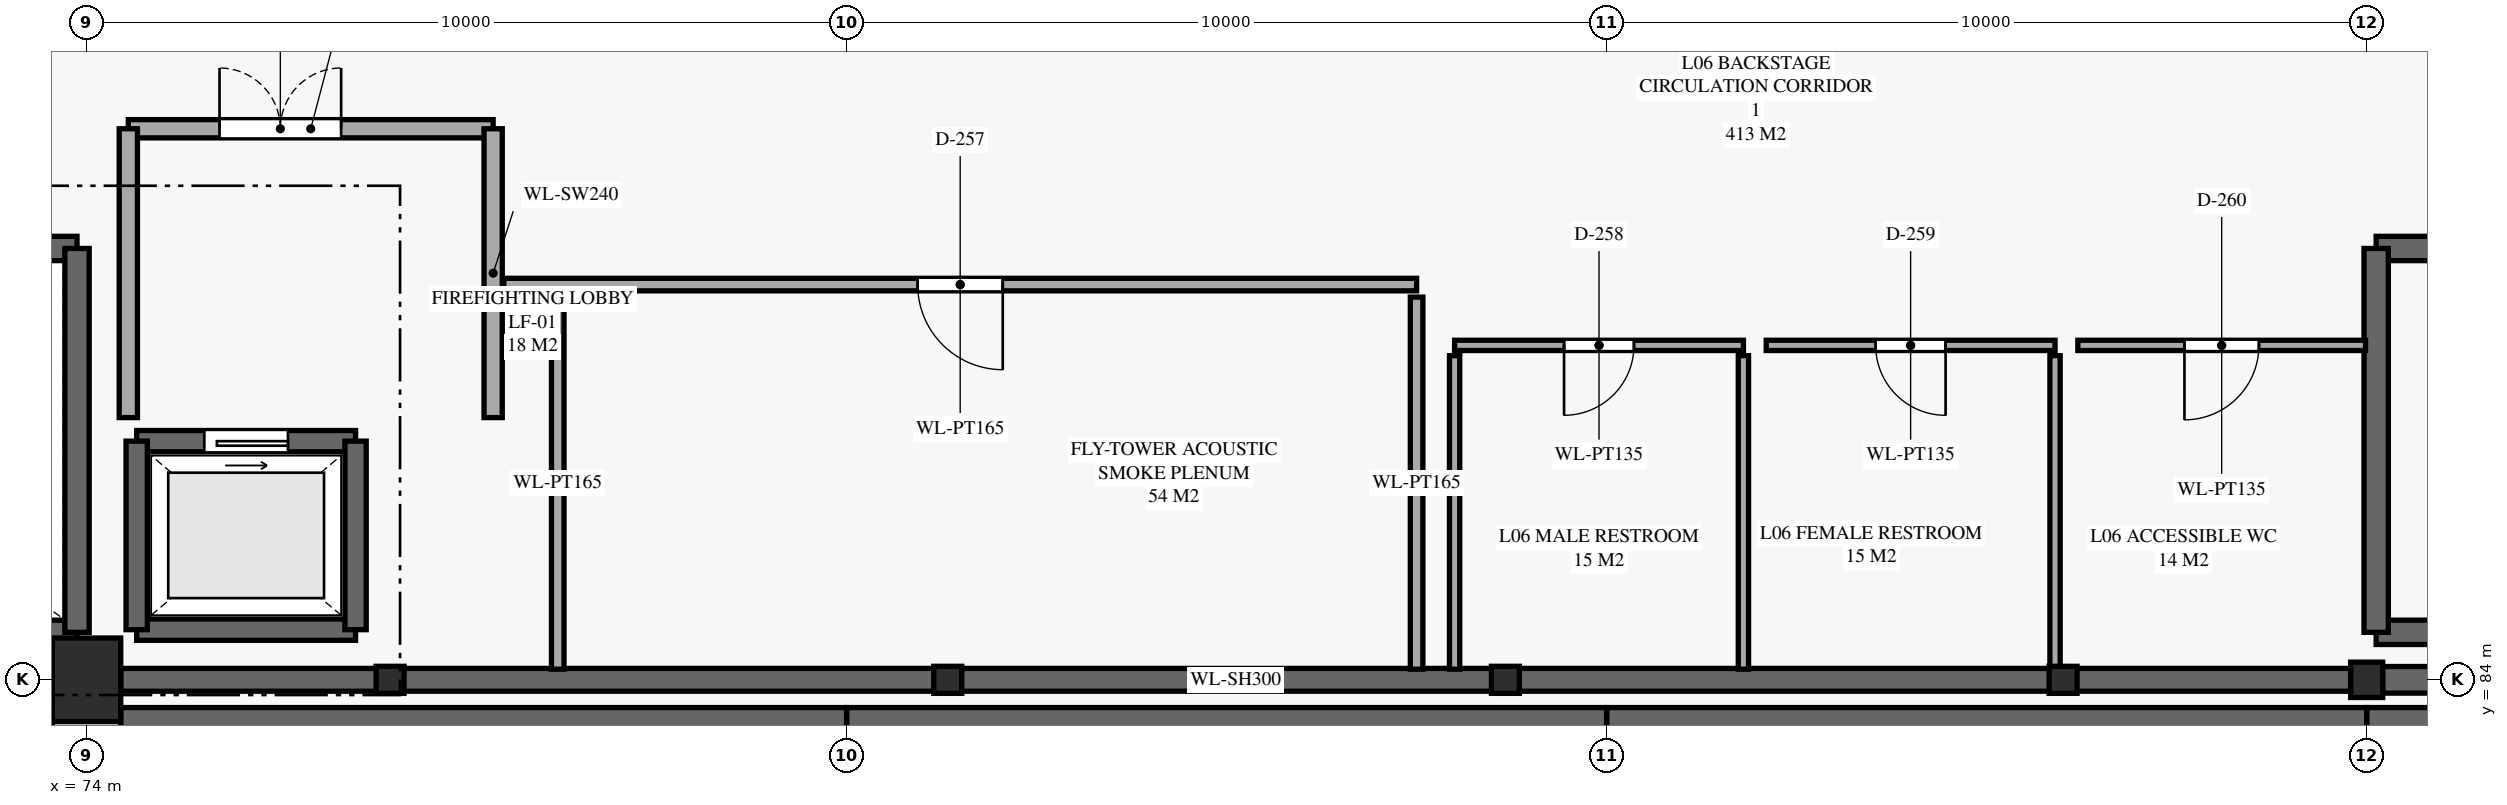
"""IFC4 building model, lengths in metres.
Left out: names, types, materials, properties, quantities, classifications, styles, units other than length and angle.
Written with IfcOpenShell. Run it as: python <this file> out.ifc"""

import sys

from ifc_helpers import new_model, si_unit, direction, frame, frame_2d, origin, origin_2d, place, context, subcontext, project, spatial, rectangle, i_section, extrude, element, fill, save


model = new_model("IFC4")
c1 = context("Model", 3, precision=1e-05, world=origin(), true_north=direction((0.0, 1.0)))
c2 = subcontext(c1, "Body", "Model", "MODEL_VIEW")
j1 = project(units=[si_unit("LENGTHUNIT", "METRE"), si_unit("PLANEANGLEUNIT", "RADIAN")], contexts=[c1])
p1 = place(None, origin())
s1 = spatial("IfcSite", under=j1, at=p1, CompositionType="ELEMENT")
p2 = place(p1, origin())
s2 = spatial("IfcBuilding", under=s1, at=p2, CompositionType="ELEMENT")
p3 = place(p2, frame((0.0, 0.0, 29.6)))
s3 = spatial("IfcBuildingStorey", under=s2, at=p3, CompositionType="ELEMENT", Elevation=29.6)
p4 = place(p3, frame((74.0, 84.0, 0.0), z_axis=(0.0, 0.0, 1.0), x_axis=(1.0, 0.0, 0.0)))
e1 = element("IfcColumn", 1, at=p4, inside=s3, PredefinedType="COLUMN", context=c2, shape_type="SweptSolid", body=[
    extrude(rectangle(XDim=0.9, YDim=1.1, at=origin_2d()), origin(), (0.0, 0.0, 1.0), 4.6),
])
p5 = place(p3, frame((104.0, 84.0, 0.0), z_axis=(0.0, 0.0, 1.0), x_axis=(1.0, 0.0, 0.0)))
e2 = element("IfcColumn", 2, at=p5, inside=s3, PredefinedType="COLUMN", context=c2, shape_type="SweptSolid", body=[
    extrude(i_section(OverallWidth=0.422, OverallDepth=0.465, WebThickness=0.045, FlangeThickness=0.073, FilletRadius=0.02, at=origin_2d()), origin(), (0.0, 0.0, 1.0), 4.6),
])
p6 = place(p2, frame((0.0, 0.0, 24.8)))
s4 = spatial("IfcBuildingStorey", under=s2, at=p6, CompositionType="ELEMENT", Elevation=24.8)
for number, where, z_axis, x_axis in (
    (3, (85.332, 84.0, -0.3), (0.0, 0.0, 1.0), (1.0, 0.0, 0.0)),
    (4, (100.006, 84.0, -0.3), (0.0, 0.0, 1.0), (1.0, 0.0, 0.0)),
):
    element("IfcColumn", number, at=place(p6, frame(where, z_axis=z_axis, x_axis=x_axis)), inside=s4, PredefinedType="COLUMN", context=c2, shape_type="SweptSolid", body=[
        extrude(i_section(OverallWidth=0.368, OverallDepth=0.356, WebThickness=0.011, FlangeThickness=0.018, FilletRadius=0.015, at=origin_2d()), origin(), (0.0, 0.0, 1.0), 6.556),
    ])
p7 = place(p3, frame((64.625, 84.625, 0.0), z_axis=(0.0, 0.0, 1.0), x_axis=(1.0, 0.0, 0.0)))
e5 = element("IfcWall", 5, at=p7, inside=s3, PredefinedType="SHEAR", context=c2, shape_type="SweptSolid", body=[
    extrude(rectangle(XDim=9.25, YDim=0.32, at=frame_2d((4.625, 0.0))), origin(), (0.0, 0.0, 1.0), 4.35),
])
p8 = place(p3, frame((73.875, 89.675, 0.0), z_axis=(0.0, 0.0, 1.0), x_axis=(-1.0, 0.0, 0.0)))
e6 = element("IfcWall", 6, at=p8, inside=s3, PredefinedType="SHEAR", context=c2, shape_type="SweptSolid", body=[
    extrude(rectangle(XDim=9.25, YDim=0.32, at=frame_2d((4.625, 0.0))), origin(), (0.0, 0.0, 1.0), 4.35),
])
p9 = place(p8, frame((7.2, 0.0, 0.0)))
e7 = element("IfcOpeningElement", 7, at=p9, cuts=e6, PredefinedType="OPENING", context=c2, shape_type="SweptSolid", body=[
    extrude(rectangle(XDim=1.15, YDim=2.2, at=frame_2d((0.575, 1.1))), frame((0.0, 0.17, 0.0), z_axis=(0.0, -1.0, 0.0), x_axis=(1.0, 0.0, 0.0)), (0.0, 0.0, 1.0), 0.34),
])
p10 = place(p3, frame((73.875, 84.625, 0.0), z_axis=(0.0, 0.0, 1.0), x_axis=(0.0, 1.0, 0.0)))
e8 = element("IfcWall", 8, at=p10, inside=s3, PredefinedType="SHEAR", context=c2, shape_type="SweptSolid", body=[
    extrude(rectangle(XDim=5.05, YDim=0.32, at=frame_2d((2.525, 0.0))), origin(), (0.0, 0.0, 1.0), 4.38),
])
p11 = place(p3, frame((104.125, 84.625, 0.0), z_axis=(0.0, 0.0, 1.0), x_axis=(1.0, 0.0, 0.0)))
e9 = element("IfcWall", 9, at=p11, inside=s3, PredefinedType="SHEAR", context=c2, shape_type="SweptSolid", body=[
    extrude(rectangle(XDim=9.25, YDim=0.32, at=frame_2d((4.625, 0.0))), origin(), (0.0, 0.0, 1.0), 4.35),
])
p12 = place(p3, frame((113.375, 89.675, 0.0), z_axis=(0.0, 0.0, 1.0), x_axis=(-1.0, 0.0, 0.0)))
e10 = element("IfcWall", 10, at=p12, inside=s3, PredefinedType="SHEAR", context=c2, shape_type="SweptSolid", body=[
    extrude(rectangle(XDim=9.25, YDim=0.32, at=frame_2d((4.625, 0.0))), origin(), (0.0, 0.0, 1.0), 4.35),
])
p13 = place(p12, frame((7.2, 0.0, 0.0)))
e11 = element("IfcOpeningElement", 11, at=p13, cuts=e10, PredefinedType="OPENING", context=c2, shape_type="SweptSolid", body=[
    extrude(rectangle(XDim=1.15, YDim=2.2, at=frame_2d((0.575, 1.1))), frame((0.0, 0.17, 0.0), z_axis=(0.0, -1.0, 0.0), x_axis=(1.0, 0.0, 0.0)), (0.0, 0.0, 1.0), 0.34),
])
p14 = place(p3, frame((104.125, 89.675, 0.0), z_axis=(0.0, 0.0, 1.0), x_axis=(0.0, -1.0, 0.0)))
e12 = element("IfcWall", 12, at=p14, inside=s3, PredefinedType="SHEAR", context=c2, shape_type="SweptSolid", body=[
    extrude(rectangle(XDim=5.05, YDim=0.32, at=frame_2d((2.525, 0.0))), origin(), (0.0, 0.0, 1.0), 4.38),
])
p15 = place(p3, frame((74.66, 84.66, 0.0), z_axis=(0.0, 0.0, 1.0), x_axis=(1.0, 0.0, 0.0)))
e13 = element("IfcWall", 13, at=p15, inside=s3, PredefinedType="SHEAR", context=c2, shape_type="SweptSolid", body=[
    extrude(rectangle(XDim=2.88, YDim=0.28, at=frame_2d((1.44, 0.0))), origin(), (0.0, 0.0, 1.0), 4.38),
])
p16 = place(p3, frame((77.54, 87.14, 0.0), z_axis=(0.0, 0.0, 1.0), x_axis=(-1.0, 0.0, 0.0)))
e14 = element("IfcWall", 14, at=p16, inside=s3, PredefinedType="SHEAR", context=c2, shape_type="SweptSolid", body=[
    extrude(rectangle(XDim=2.88, YDim=0.28, at=frame_2d((1.44, 0.0))), origin(), (0.0, 0.0, 1.0), 4.38),
])
p17 = place(p16, frame((0.89, 0.0, 0.0)))
e15 = element("IfcOpeningElement", 15, at=p17, cuts=e14, PredefinedType="OPENING", context=c2, shape_type="SweptSolid", body=[
    extrude(rectangle(XDim=1.1, YDim=2.2, at=frame_2d((0.55, 1.1))), frame((0.0, 0.15, 0.0), z_axis=(0.0, -1.0, 0.0), x_axis=(1.0, 0.0, 0.0)), (0.0, 0.0, 1.0), 0.3),
])
for number, where, z_axis, x_axis in (
    (16, (74.66, 87.14, 0.0), (0.0, 0.0, 1.0), (0.0, -1.0, 0.0)),
    (17, (77.54, 84.66, 0.0), (0.0, 0.0, 1.0), (0.0, 1.0, 0.0)),
):
    element("IfcWall", number, at=place(p3, frame(where, z_axis=z_axis, x_axis=x_axis)), inside=s3, PredefinedType="SHEAR", context=c2, shape_type="SweptSolid", body=[
        extrude(rectangle(XDim=2.48, YDim=0.28, at=frame_2d((1.24, 0.0))), origin(), (0.0, 0.0, 1.0), 4.38),
    ])
p18 = place(p3, frame((74.55, 91.25, 0.0), z_axis=(0.0, 0.0, 1.0), x_axis=(1.0, 0.0, 0.0)))
e18 = element("IfcWall", 18, at=p18, inside=s3, PredefinedType="SOLIDWALL", context=c2, shape_type="SweptSolid", body=[
    extrude(rectangle(XDim=4.8, YDim=0.24, at=frame_2d((2.4, 0.0))), origin(), (0.0, 0.0, 1.0), 4.35),
])
p19 = place(p18, frame((1.2, 0.0, 0.0)))
e19 = element("IfcOpeningElement", 19, at=p19, cuts=e18, PredefinedType="OPENING", context=c2, shape_type="SweptSolid", body=[
    extrude(rectangle(XDim=1.6, YDim=2.2, at=frame_2d((0.8, 1.1))), frame((0.0, 0.13, 0.0), z_axis=(0.0, -1.0, 0.0), x_axis=(1.0, 0.0, 0.0)), (0.0, 0.0, 1.0), 0.26),
])
p20 = place(p3, frame((74.55, 91.25, 0.0), z_axis=(0.0, 0.0, 1.0), x_axis=(0.0, -1.0, 0.0)))
e20 = element("IfcWall", 20, at=p20, inside=s3, PredefinedType="SOLIDWALL", context=c2, shape_type="SweptSolid", body=[
    extrude(rectangle(XDim=3.8, YDim=0.24, at=frame_2d((1.9, 0.0))), origin(), (0.0, 0.0, 1.0), 4.38),
])
p21 = place(p3, frame((79.35, 87.45, 0.0), z_axis=(0.0, 0.0, 1.0), x_axis=(0.0, 1.0, 0.0)))
e21 = element("IfcWall", 21, at=p21, inside=s3, PredefinedType="SOLIDWALL", context=c2, shape_type="SweptSolid", body=[
    extrude(rectangle(XDim=3.8, YDim=0.24, at=frame_2d((1.9, 0.0))), origin(), (0.0, 0.0, 1.0), 4.35),
])
p22 = place(p3, frame((104.211, 84.0, 0.0), z_axis=(0.0, 0.0, 1.0), x_axis=(1.0, 0.0, 0.0)))
e22 = element("IfcWall", 22, at=p22, inside=s3, PredefinedType="SHEAR", context=c2, shape_type="SweptSolid", body=[
    extrude(rectangle(XDim=9.079, YDim=0.35, at=frame_2d((4.54, 0.0))), origin(), (0.0, 0.0, 1.0), 4.35),
])
p23 = place(p3, frame((74.45, 84.0, 0.0), z_axis=(0.0, 0.0, 1.0), x_axis=(1.0, 0.0, 0.0)))
e23 = element("IfcWall", 23, at=p23, inside=s3, PredefinedType="SHEAR", context=c2, shape_type="SweptSolid", body=[
    extrude(rectangle(XDim=29.339, YDim=0.3, at=frame_2d((14.669, 0.0))), origin(), (0.0, 0.0, 1.0), 4.35),
])
p24 = place(p3, frame((113.29, 83.46, 0.0), z_axis=(0.0, 0.0, 1.0), x_axis=(-1.0, 0.0, 0.0)))
e24 = element("IfcWall", 24, at=p24, inside=s3, PredefinedType="SHEAR", context=c2, shape_type="SweptSolid", body=[
    extrude(rectangle(XDim=9.29, YDim=0.35, at=frame_2d((4.645, 0.0))), origin(), (0.0, 0.0, 1.0), 4.35),
])
for number, where, z_axis, x_axis in (
    (25, (104.0, 83.46, 0.0), (0.0, 0.0, 1.0), (-1.0, 0.0, 0.0)),
    (26, (94.0, 83.46, 0.0), (0.0, 0.0, 1.0), (-1.0, 0.0, 0.0)),
):
    element("IfcWall", number, at=place(p3, frame(where, z_axis=z_axis, x_axis=x_axis)), inside=s3, PredefinedType="SHEAR", context=c2, shape_type="SweptSolid", body=[
        extrude(rectangle(XDim=10.0, YDim=0.35, at=frame_2d((5.0, 0.0))), origin(), (0.0, 0.0, 1.0), 4.35),
    ])
p25 = place(p3, frame((84.0, 83.46, 0.0), z_axis=(0.0, 0.0, 1.0), x_axis=(-1.0, 0.0, 0.0)))
e27 = element("IfcWall", 27, at=p25, inside=s3, PredefinedType="SHEAR", context=c2, shape_type="SweptSolid", body=[
    extrude(rectangle(XDim=9.55, YDim=0.35, at=frame_2d((4.775, 0.0))), origin(), (0.0, 0.0, 1.0), 4.35),
])
p26 = place(p3, frame((91.5, 89.2, 0.0), z_axis=(0.0, 0.0, 1.0), x_axis=(-1.0, 0.0, 0.0)))
e28 = element("IfcWall", 28, at=p26, inside=s3, PredefinedType="PARTITIONING", context=c2, shape_type="SweptSolid", body=[
    extrude(rectangle(XDim=12.01, YDim=0.165, at=frame_2d((6.005, 0.0))), origin(), (0.0, 0.0, 1.0), 4.35),
])
p27 = place(p26, frame((5.445, 0.0, 0.0)))
e29 = element("IfcOpeningElement", 29, at=p27, cuts=e28, PredefinedType="OPENING", context=c2, shape_type="SweptSolid", body=[
    extrude(rectangle(XDim=1.12, YDim=2.25, at=frame_2d((0.56, 1.125))), frame((0.0, 0.093, 0.0), z_axis=(0.0, -1.0, 0.0), x_axis=(1.0, 0.0, 0.0)), (0.0, 0.0, 1.0), 0.185),
])
p28 = place(p3, frame((80.2, 89.035, 0.0), z_axis=(0.0, 0.0, 1.0), x_axis=(0.0, -1.0, 0.0)))
e30 = element("IfcWall", 30, at=p28, inside=s3, PredefinedType="PARTITIONING", context=c2, shape_type="SweptSolid", body=[
    extrude(rectangle(XDim=4.895, YDim=0.165, at=frame_2d((2.448, 0.0))), origin(), (0.0, 0.0, 1.0), 4.35),
])
p29 = place(p3, frame((91.5, 84.14, 0.0), z_axis=(0.0, 0.0, 1.0), x_axis=(0.0, 1.0, 0.0)))
e31 = element("IfcWall", 31, at=p29, inside=s3, PredefinedType="PARTITIONING", context=c2, shape_type="SweptSolid", body=[
    extrude(rectangle(XDim=4.895, YDim=0.165, at=frame_2d((2.448, 0.0))), origin(), (0.0, 0.0, 1.0), 4.38),
])
p30 = place(p3, frame((95.8, 88.4, 0.0), z_axis=(0.0, 0.0, 1.0), x_axis=(-1.0, 0.0, 0.0)))
e32 = element("IfcWall", 32, at=p30, inside=s3, PredefinedType="PARTITIONING", context=c2, shape_type="SweptSolid", body=[
    extrude(rectangle(XDim=3.8, YDim=0.135, at=frame_2d((1.9, 0.0))), origin(), (0.0, 0.0, 1.0), 4.35),
])
p31 = place(p30, frame((1.44, 0.0, 0.0)))
e33 = element("IfcOpeningElement", 33, at=p31, cuts=e32, PredefinedType="OPENING", context=c2, shape_type="SweptSolid", body=[
    extrude(rectangle(XDim=0.92, YDim=2.1, at=frame_2d((0.46, 1.05))), frame((0.0, 0.078, 0.0), z_axis=(0.0, -1.0, 0.0), x_axis=(1.0, 0.0, 0.0)), (0.0, 0.0, 1.0), 0.155),
])
p32 = place(p3, frame((92.0, 88.265, 0.0), z_axis=(0.0, 0.0, 1.0), x_axis=(0.0, -1.0, 0.0)))
e34 = element("IfcWall", 34, at=p32, inside=s3, PredefinedType="PARTITIONING", context=c2, shape_type="SweptSolid", body=[
    extrude(rectangle(XDim=4.125, YDim=0.135, at=frame_2d((2.062, 0.0))), origin(), (0.0, 0.0, 1.0), 4.38),
])
p33 = place(p3, frame((95.8, 84.14, 0.0), z_axis=(0.0, 0.0, 1.0), x_axis=(0.0, 1.0, 0.0)))
e35 = element("IfcWall", 35, at=p33, inside=s3, PredefinedType="PARTITIONING", context=c2, shape_type="SweptSolid", body=[
    extrude(rectangle(XDim=4.125, YDim=0.135, at=frame_2d((2.062, 0.0))), origin(), (0.0, 0.0, 1.0), 4.35),
])
p34 = place(p3, frame((99.9, 88.4, 0.0), z_axis=(0.0, 0.0, 1.0), x_axis=(-1.0, 0.0, 0.0)))
e36 = element("IfcWall", 36, at=p34, inside=s3, PredefinedType="PARTITIONING", context=c2, shape_type="SweptSolid", body=[
    extrude(rectangle(XDim=3.8, YDim=0.135, at=frame_2d((1.9, 0.0))), origin(), (0.0, 0.0, 1.0), 4.35),
])
p35 = place(p34, frame((1.44, 0.0, 0.0)))
e37 = element("IfcOpeningElement", 37, at=p35, cuts=e36, PredefinedType="OPENING", context=c2, shape_type="SweptSolid", body=[
    extrude(rectangle(XDim=0.92, YDim=2.1, at=frame_2d((0.46, 1.05))), frame((0.0, 0.078, 0.0), z_axis=(0.0, -1.0, 0.0), x_axis=(1.0, 0.0, 0.0)), (0.0, 0.0, 1.0), 0.155),
])
p36 = place(p3, frame((99.9, 84.14, 0.0), z_axis=(0.0, 0.0, 1.0), x_axis=(0.0, 1.0, 0.0)))
e38 = element("IfcWall", 38, at=p36, inside=s3, PredefinedType="PARTITIONING", context=c2, shape_type="SweptSolid", body=[
    extrude(rectangle(XDim=4.125, YDim=0.135, at=frame_2d((2.062, 0.0))), origin(), (0.0, 0.0, 1.0), 3.723),
])
p37 = place(p3, frame((103.985, 88.4, 0.0), z_axis=(0.0, 0.0, 1.0), x_axis=(-1.0, 0.0, 0.0)))
e39 = element("IfcWall", 39, at=p37, inside=s3, PredefinedType="PARTITIONING", context=c2, shape_type="SweptSolid", body=[
    extrude(rectangle(XDim=3.785, YDim=0.135, at=frame_2d((1.893, 0.0))), origin(), (0.0, 0.0, 1.0), 4.38),
])
p38 = place(p37, frame((1.403, 0.0, 0.0)))
e40 = element("IfcOpeningElement", 40, at=p38, cuts=e39, PredefinedType="OPENING", context=c2, shape_type="SweptSolid", body=[
    extrude(rectangle(XDim=0.98, YDim=2.1, at=frame_2d((0.49, 1.05))), frame((0.0, 0.078, 0.0), z_axis=(0.0, -1.0, 0.0), x_axis=(1.0, 0.0, 0.0)), (0.0, 0.0, 1.0), 0.155),
])
p39 = place(p17, origin())
e41 = element("IfcDoor", 41, at=p39, inside=s3, OperationType="SLIDING_TO_LEFT", PredefinedType="DOOR", context=c2, shape_type="SweptSolid", body=[
    extrude(rectangle(XDim=1.1, YDim=2.2, at=frame_2d((0.55, 1.1))), frame((0.0, 0.025, 0.0), z_axis=(0.0, -1.0, 0.0), x_axis=(1.0, 0.0, 0.0)), (0.0, 0.0, 1.0), 0.05),
])
fill(e15, e41)
p40 = place(p19, origin())
e42 = element("IfcDoor", 42, at=p40, inside=s3, OperationType="DOUBLE_DOOR_SINGLE_SWING", PredefinedType="DOOR", context=c2, shape_type="SweptSolid", body=[
    extrude(rectangle(XDim=1.6, YDim=2.2, at=frame_2d((0.8, 1.1))), frame((0.0, 0.025, 0.0), z_axis=(0.0, -1.0, 0.0), x_axis=(1.0, 0.0, 0.0)), (0.0, 0.0, 1.0), 0.05),
])
fill(e19, e42)
p41 = place(p27, origin())
e43 = element("IfcDoor", 43, at=p41, inside=s3, OperationType="SINGLE_SWING_LEFT", PredefinedType="DOOR", context=c2, shape_type="SweptSolid", body=[
    extrude(rectangle(XDim=1.12, YDim=2.25, at=frame_2d((0.56, 1.125))), frame((0.0, 0.025, 0.0), z_axis=(0.0, -1.0, 0.0), x_axis=(1.0, 0.0, 0.0)), (0.0, 0.0, 1.0), 0.05),
])
fill(e29, e43)
p42 = place(p31, origin())
e44 = element("IfcDoor", 44, at=p42, inside=s3, OperationType="SINGLE_SWING_RIGHT", PredefinedType="DOOR", context=c2, shape_type="SweptSolid", body=[
    extrude(rectangle(XDim=0.92, YDim=2.1, at=frame_2d((0.46, 1.05))), frame((0.0, 0.025, 0.0), z_axis=(0.0, -1.0, 0.0), x_axis=(1.0, 0.0, 0.0)), (0.0, 0.0, 1.0), 0.05),
])
fill(e33, e44)
p43 = place(p35, origin())
e45 = element("IfcDoor", 45, at=p43, inside=s3, OperationType="SINGLE_SWING_LEFT", PredefinedType="DOOR", context=c2, shape_type="SweptSolid", body=[
    extrude(rectangle(XDim=0.92, YDim=2.1, at=frame_2d((0.46, 1.05))), frame((0.0, 0.025, 0.0), z_axis=(0.0, -1.0, 0.0), x_axis=(1.0, 0.0, 0.0)), (0.0, 0.0, 1.0), 0.05),
])
fill(e37, e45)
p44 = place(p38, origin())
e46 = element("IfcDoor", 46, at=p44, inside=s3, OperationType="SINGLE_SWING_RIGHT", PredefinedType="DOOR", context=c2, shape_type="SweptSolid", body=[
    extrude(rectangle(XDim=0.98, YDim=2.1, at=frame_2d((0.49, 1.05))), frame((0.0, 0.025, 0.0), z_axis=(0.0, -1.0, 0.0), x_axis=(1.0, 0.0, 0.0)), (0.0, 0.0, 1.0), 0.05),
])
fill(e40, e46)
save(model, sys.argv[1])
